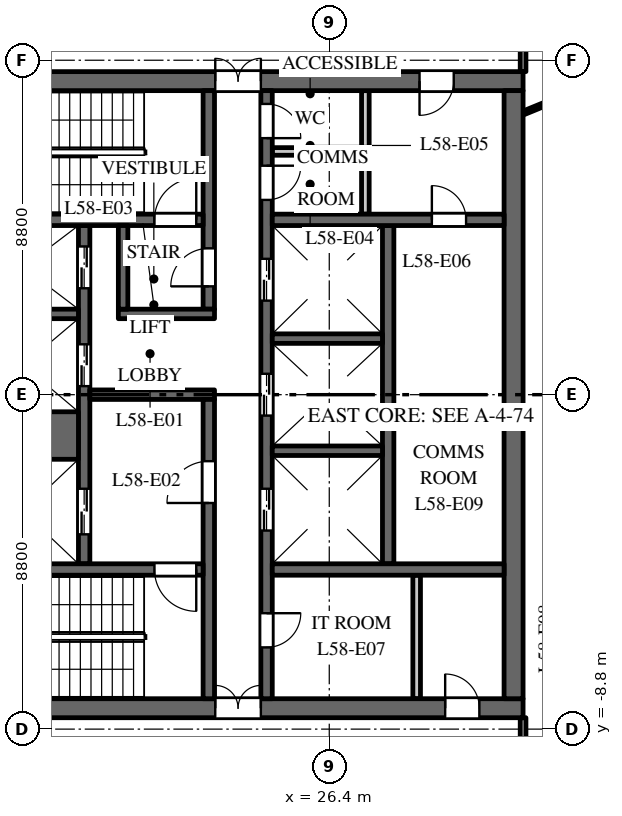
"""IFC4 building model, lengths in metres.
Left out: names, types, materials, properties, quantities, classifications, styles, units other than length and angle.
Written with IfcOpenShell. Run it as: python <this file> out.ifc"""

import sys

from ifc_helpers import new_model, si_unit, direction, frame, frame_2d, origin, place, context, subcontext, project, spatial, rectangle, extrude, element, fill, save


model = new_model("IFC4")
c1 = context("Model", 3, precision=1e-05, world=origin(), true_north=direction((0.0, 1.0)))
c2 = subcontext(c1, "Body", "Model", "MODEL_VIEW")
j1 = project(units=[si_unit("LENGTHUNIT", "METRE"), si_unit("PLANEANGLEUNIT", "RADIAN")], contexts=[c1])
p1 = place(None, origin())
s1 = spatial("IfcSite", under=j1, at=p1, CompositionType="ELEMENT")
p2 = place(p1, origin())
s2 = spatial("IfcBuilding", under=s1, at=p2, CompositionType="ELEMENT")
p3 = place(p2, frame((0.0, 0.0, 273.5)))
s3 = spatial("IfcBuildingStorey", under=s2, at=p3, CompositionType="ELEMENT", Elevation=273.5)
p4 = place(p3, frame((16.5, 8.25, 0.0), z_axis=(0.0, 0.0, 1.0), x_axis=(1.0, 0.0, 0.0)))
e1 = element("IfcWall", 1, at=p4, inside=s3, PredefinedType="SHEAR", context=c2, shape_type="SweptSolid", body=[
    extrude(rectangle(XDim=15.0, YDim=0.5, at=frame_2d((7.5, 0.0))), origin(), (0.0, 0.0, 1.0), 3.7),
])
p5 = place(p4, frame((6.9, 0.0, 0.0)))
e2 = element("IfcOpeningElement", 2, at=p5, cuts=e1, PredefinedType="OPENING", context=c2, shape_type="SweptSolid", body=[
    extrude(rectangle(XDim=1.2, YDim=2.1, at=frame_2d((0.6, 1.05))), frame((0.0, 0.26, 0.0), z_axis=(0.0, -1.0, 0.0), x_axis=(1.0, 0.0, 0.0)), (0.0, 0.0, 1.0), 0.52),
])
p6 = place(p4, frame((12.275, 0.0, 0.0)))
e3 = element("IfcOpeningElement", 3, at=p6, cuts=e1, PredefinedType="OPENING", context=c2, shape_type="SweptSolid", body=[
    extrude(rectangle(XDim=0.9, YDim=2.1, at=frame_2d((0.45, 1.05))), frame((0.0, 0.26, 0.0), z_axis=(0.0, -1.0, 0.0), x_axis=(1.0, 0.0, 0.0)), (0.0, 0.0, 1.0), 0.52),
])
p7 = place(p3, frame((16.5, -8.25, 0.0), z_axis=(0.0, 0.0, 1.0), x_axis=(1.0, 0.0, 0.0)))
e4 = element("IfcWall", 4, at=p7, inside=s3, PredefinedType="SHEAR", context=c2, shape_type="SweptSolid", body=[
    extrude(rectangle(XDim=15.0, YDim=0.5, at=frame_2d((7.5, 0.0))), origin(), (0.0, 0.0, 1.0), 3.7),
])
p8 = place(p7, frame((6.9, 0.0, 0.0)))
e5 = element("IfcOpeningElement", 5, at=p8, cuts=e4, PredefinedType="OPENING", context=c2, shape_type="SweptSolid", body=[
    extrude(rectangle(XDim=1.2, YDim=2.1, at=frame_2d((0.6, 1.05))), frame((0.0, 0.26, 0.0), z_axis=(0.0, -1.0, 0.0), x_axis=(1.0, 0.0, 0.0)), (0.0, 0.0, 1.0), 0.52),
])
p9 = place(p7, frame((12.95, 0.0, 0.0)))
e6 = element("IfcOpeningElement", 6, at=p9, cuts=e4, PredefinedType="OPENING", context=c2, shape_type="SweptSolid", body=[
    extrude(rectangle(XDim=0.9, YDim=2.1, at=frame_2d((0.45, 1.05))), frame((0.0, 0.26, 0.0), z_axis=(0.0, -1.0, 0.0), x_axis=(1.0, 0.0, 0.0)), (0.0, 0.0, 1.0), 0.52),
])
p10 = place(p3, frame((27.95, -4.45, 0.0), z_axis=(0.0, 0.0, 1.0), x_axis=(0.0, 1.0, 0.0)))
e7 = element("IfcWall", 7, at=p10, inside=s3, PredefinedType="SHEAR", context=c2, shape_type="SweptSolid", body=[
    extrude(rectangle(XDim=8.9, YDim=0.3, at=frame_2d((4.45, 0.0))), origin(), (0.0, 0.0, 1.0), 3.7),
])
p11 = place(p3, frame((19.95, -4.45, 0.0), z_axis=(0.0, 0.0, 1.0), x_axis=(0.0, 1.0, 0.0)))
e8 = element("IfcWall", 8, at=p11, inside=s3, PredefinedType="SHEAR", context=c2, shape_type="SweptSolid", body=[
    extrude(rectangle(XDim=8.9, YDim=0.3, at=frame_2d((4.45, 0.0))), origin(), (0.0, 0.0, 1.0), 3.7),
])
p12 = place(p11, frame((0.775, 0.0, 0.0)))
e9 = element("IfcOpeningElement", 9, at=p12, cuts=e8, PredefinedType="OPENING", context=c2, shape_type="SweptSolid", body=[
    extrude(rectangle(XDim=1.2, YDim=2.1, at=frame_2d((0.6, 1.05))), frame((0.0, 0.16, 0.0), z_axis=(0.0, -1.0, 0.0), x_axis=(1.0, 0.0, 0.0)), (0.0, 0.0, 1.0), 0.32),
])
p13 = place(p11, frame((4.675, 0.0, 0.0)))
e10 = element("IfcOpeningElement", 10, at=p13, cuts=e8, PredefinedType="OPENING", context=c2, shape_type="SweptSolid", body=[
    extrude(rectangle(XDim=1.1, YDim=2.1, at=frame_2d((0.55, 1.05))), frame((0.0, 0.16, 0.0), z_axis=(0.0, -1.0, 0.0), x_axis=(1.0, 0.0, 0.0)), (0.0, 0.0, 1.0), 0.32),
])
p14 = place(p11, frame((7.25, 0.0, 0.0)))
e11 = element("IfcOpeningElement", 11, at=p14, cuts=e8, PredefinedType="OPENING", context=c2, shape_type="SweptSolid", body=[
    extrude(rectangle(XDim=1.1, YDim=2.1, at=frame_2d((0.55, 1.05))), frame((0.0, 0.16, 0.0), z_axis=(0.0, -1.0, 0.0), x_axis=(1.0, 0.0, 0.0)), (0.0, 0.0, 1.0), 0.32),
])
p15 = place(p3, frame((24.75, -8.0, 0.0), z_axis=(0.0, 0.0, 1.0), x_axis=(0.0, 1.0, 0.0)))
e12 = element("IfcWall", 12, at=p15, inside=s3, PredefinedType="SHEAR", context=c2, shape_type="SweptSolid", body=[
    extrude(rectangle(XDim=16.0, YDim=0.3, at=frame_2d((8.0, 0.0))), origin(), (0.0, 0.0, 1.0), 3.7),
])
p16 = place(p15, frame((4.425, 0.0, 0.0)))
e13 = element("IfcOpeningElement", 13, at=p16, cuts=e12, PredefinedType="OPENING", context=c2, shape_type="SweptSolid", body=[
    extrude(rectangle(XDim=1.1, YDim=2.1, at=frame_2d((0.55, 1.05))), frame((0.0, 0.16, 0.0), z_axis=(0.0, -1.0, 0.0), x_axis=(1.0, 0.0, 0.0)), (0.0, 0.0, 1.0), 0.32),
])
p17 = place(p15, frame((7.45, 0.0, 0.0)))
e14 = element("IfcOpeningElement", 14, at=p17, cuts=e12, PredefinedType="OPENING", context=c2, shape_type="SweptSolid", body=[
    extrude(rectangle(XDim=1.1, YDim=2.1, at=frame_2d((0.55, 1.05))), frame((0.0, 0.16, 0.0), z_axis=(0.0, -1.0, 0.0), x_axis=(1.0, 0.0, 0.0)), (0.0, 0.0, 1.0), 0.32),
])
p18 = place(p15, frame((10.475, 0.0, 0.0)))
e15 = element("IfcOpeningElement", 15, at=p18, cuts=e12, PredefinedType="OPENING", context=c2, shape_type="SweptSolid", body=[
    extrude(rectangle(XDim=1.1, YDim=2.1, at=frame_2d((0.55, 1.05))), frame((0.0, 0.16, 0.0), z_axis=(0.0, -1.0, 0.0), x_axis=(1.0, 0.0, 0.0)), (0.0, 0.0, 1.0), 0.32),
])
p19 = place(p15, frame((13.125, 0.0, 0.0)))
e16 = element("IfcOpeningElement", 16, at=p19, cuts=e12, PredefinedType="OPENING", context=c2, shape_type="SweptSolid", body=[
    extrude(rectangle(XDim=0.9, YDim=2.1, at=frame_2d((0.45, 1.05))), frame((0.0, 0.16, 0.0), z_axis=(0.0, -1.0, 0.0), x_axis=(1.0, 0.0, 0.0)), (0.0, 0.0, 1.0), 0.32),
])
p20 = place(p15, frame((14.75, 0.0, 0.0)))
e17 = element("IfcOpeningElement", 17, at=p20, cuts=e12, PredefinedType="OPENING", context=c2, shape_type="SweptSolid", body=[
    extrude(rectangle(XDim=0.9, YDim=2.1, at=frame_2d((0.45, 1.05))), frame((0.0, 0.16, 0.0), z_axis=(0.0, -1.0, 0.0), x_axis=(1.0, 0.0, 0.0)), (0.0, 0.0, 1.0), 0.32),
])
p21 = place(p15, frame((1.35, 0.0, 0.0)))
e18 = element("IfcOpeningElement", 18, at=p21, cuts=e12, PredefinedType="OPENING", context=c2, shape_type="SweptSolid", body=[
    extrude(rectangle(XDim=0.9, YDim=2.1, at=frame_2d((0.45, 1.05))), frame((0.0, 0.16, 0.0), z_axis=(0.0, -1.0, 0.0), x_axis=(1.0, 0.0, 0.0)), (0.0, 0.0, 1.0), 0.32),
])
p22 = place(p3, frame((20.1, 0.0, 0.0), z_axis=(0.0, 0.0, 1.0), x_axis=(1.0, 0.0, 0.0)))
e19 = element("IfcWall", 19, at=p22, inside=s3, PredefinedType="SHEAR", context=c2, shape_type="SweptSolid", body=[
    extrude(rectangle(XDim=3.28, YDim=0.25, at=frame_2d((1.64, 0.0))), origin(), (0.0, 0.0, 1.0), 3.7),
])
p23 = place(p3, frame((31.25, -8.0, 0.0), z_axis=(0.0, 0.0, 1.0), x_axis=(0.0, 1.0, 0.0)))
e20 = element("IfcWall", 20, at=p23, inside=s3, PredefinedType="SHEAR", context=c2, shape_type="SweptSolid", body=[
    extrude(rectangle(XDim=16.0, YDim=0.5, at=frame_2d((8.0, 0.0))), origin(), (0.0, 0.0, 1.0), 3.7),
])
p24 = place(p3, frame((24.9, 4.6, 0.0), z_axis=(0.0, 0.0, 1.0), x_axis=(1.0, 0.0, 0.0)))
e21 = element("IfcWall", 21, at=p24, inside=s3, PredefinedType="SHEAR", context=c2, shape_type="SweptSolid", body=[
    extrude(rectangle(XDim=6.1, YDim=0.3, at=frame_2d((3.05, 0.0))), origin(), (0.0, 0.0, 1.0), 3.7),
])
p25 = place(p24, frame((4.2, 0.0, 0.0)))
e22 = element("IfcOpeningElement", 22, at=p25, cuts=e21, PredefinedType="OPENING", context=c2, shape_type="SweptSolid", body=[
    extrude(rectangle(XDim=0.9, YDim=2.1, at=frame_2d((0.45, 1.05))), frame((0.0, 0.16, 0.0), z_axis=(0.0, -1.0, 0.0), x_axis=(1.0, 0.0, 0.0)), (0.0, 0.0, 1.0), 0.32),
])
for number, where, z_axis, x_axis in (
    (23, (27.35, 4.75, 0.0), (0.0, 0.0, 1.0), (0.0, 1.0, 0.0)),
    (24, (28.7, -8.0, 0.0), (0.0, 0.0, 1.0), (0.0, 1.0, 0.0)),
):
    element("IfcWall", number, at=place(p3, frame(where, z_axis=z_axis, x_axis=x_axis)), inside=s3, PredefinedType="PARTITIONING", context=c2, shape_type="SweptSolid", body=[
        extrude(rectangle(XDim=3.25, YDim=0.2, at=frame_2d((1.625, 0.0))), origin(), (0.0, 0.0, 1.0), 3.7),
    ])
p26 = place(p3, frame((24.9, 6.4, 0.0), z_axis=(0.0, 0.0, 1.0), x_axis=(1.0, 0.0, 0.0)))
e25 = element("IfcWall", 25, at=p26, inside=s3, PredefinedType="PARTITIONING", context=c2, shape_type="SweptSolid", body=[
    extrude(rectangle(XDim=2.35, YDim=0.2, at=frame_2d((1.175, 0.0))), origin(), (0.0, 0.0, 1.0), 3.7),
])
p27 = place(p3, frame((24.9, -4.6, 0.0), z_axis=(0.0, 0.0, 1.0), x_axis=(1.0, 0.0, 0.0)))
e26 = element("IfcWall", 26, at=p27, inside=s3, PredefinedType="SHEAR", context=c2, shape_type="SweptSolid", body=[
    extrude(rectangle(XDim=6.1, YDim=0.3, at=frame_2d((3.05, 0.0))), origin(), (0.0, 0.0, 1.0), 3.7),
])
p28 = place(p3, frame((16.9, -1.075, 0.0), z_axis=(0.0, 0.0, 1.0), x_axis=(1.0, 0.0, 0.0)))
e27 = element("IfcWall", 27, at=p28, inside=s3, PredefinedType="SHEAR", context=c2, shape_type="SweptSolid", body=[
    extrude(rectangle(XDim=2.9, YDim=1.25, at=frame_2d((1.45, 0.0))), origin(), (0.0, 0.0, 1.0), 3.7),
])
for number, where, z_axis, x_axis in (
    (28, (16.9, 2.125, 0.0), (0.0, 0.0, 1.0), (1.0, 0.0, 0.0)),
    (29, (24.9, -1.475, 0.0), (0.0, 0.0, 1.0), (1.0, 0.0, 0.0)),
    (30, (24.9, 1.475, 0.0), (0.0, 0.0, 1.0), (1.0, 0.0, 0.0)),
):
    element("IfcWall", number, at=place(p3, frame(where, z_axis=z_axis, x_axis=x_axis)), inside=s3, PredefinedType="SHEAR", context=c2, shape_type="SweptSolid", body=[
        extrude(rectangle(XDim=2.9, YDim=0.25, at=frame_2d((1.45, 0.0))), origin(), (0.0, 0.0, 1.0), 3.7),
    ])
p29 = place(p3, frame((23.23, 2.25, 0.0), z_axis=(0.0, 0.0, 1.0), x_axis=(0.0, 1.0, 0.0)))
e31 = element("IfcWall", 31, at=p29, inside=s3, PredefinedType="SHEAR", context=c2, shape_type="SweptSolid", body=[
    extrude(rectangle(XDim=5.75, YDim=0.3, at=frame_2d((2.875, 0.0))), origin(), (0.0, 0.0, 1.0), 3.7),
])
p30 = place(p29, frame((0.6, 0.0, 0.0)))
e32 = element("IfcOpeningElement", 32, at=p30, cuts=e31, PredefinedType="OPENING", context=c2, shape_type="SweptSolid", body=[
    extrude(rectangle(XDim=1.0, YDim=2.1, at=frame_2d((0.5, 1.05))), frame((0.0, 0.16, 0.0), z_axis=(0.0, -1.0, 0.0), x_axis=(1.0, 0.0, 0.0)), (0.0, 0.0, 1.0), 0.32),
])
p31 = place(p3, frame((23.23, -8.0, 0.0), z_axis=(0.0, 0.0, 1.0), x_axis=(0.0, 1.0, 0.0)))
e33 = element("IfcWall", 33, at=p31, inside=s3, PredefinedType="SHEAR", context=c2, shape_type="SweptSolid", body=[
    extrude(rectangle(XDim=7.875, YDim=0.3, at=frame_2d((3.938, 0.0))), origin(), (0.0, 0.0, 1.0), 3.7),
])
p32 = place(p31, frame((5.15, 0.0, 0.0)))
e34 = element("IfcOpeningElement", 34, at=p32, cuts=e33, PredefinedType="OPENING", context=c2, shape_type="SweptSolid", body=[
    extrude(rectangle(XDim=1.1, YDim=2.1, at=frame_2d((0.55, 1.05))), frame((0.0, 0.16, 0.0), z_axis=(0.0, -1.0, 0.0), x_axis=(1.0, 0.0, 0.0)), (0.0, 0.0, 1.0), 0.32),
])
p33 = place(p3, frame((16.9, 4.6, 0.0), z_axis=(0.0, 0.0, 1.0), x_axis=(1.0, 0.0, 0.0)))
e35 = element("IfcWall", 35, at=p33, inside=s3, PredefinedType="SHEAR", context=c2, shape_type="SweptSolid", body=[
    extrude(rectangle(XDim=6.18, YDim=0.3, at=frame_2d((3.09, 0.0))), origin(), (0.0, 0.0, 1.0), 3.7),
])
p34 = place(p33, frame((4.9, 0.0, 0.0)))
e36 = element("IfcOpeningElement", 36, at=p34, cuts=e35, PredefinedType="OPENING", context=c2, shape_type="SweptSolid", body=[
    extrude(rectangle(XDim=1.1, YDim=2.1, at=frame_2d((0.55, 1.05))), frame((0.0, 0.16, 0.0), z_axis=(0.0, -1.0, 0.0), x_axis=(1.0, 0.0, 0.0)), (0.0, 0.0, 1.0), 0.32),
])
p35 = place(p3, frame((16.9, -4.6, 0.0), z_axis=(0.0, 0.0, 1.0), x_axis=(1.0, 0.0, 0.0)))
e37 = element("IfcWall", 37, at=p35, inside=s3, PredefinedType="SHEAR", context=c2, shape_type="SweptSolid", body=[
    extrude(rectangle(XDim=6.18, YDim=0.3, at=frame_2d((3.09, 0.0))), origin(), (0.0, 0.0, 1.0), 3.7),
])
p36 = place(p35, frame((4.9, 0.0, 0.0)))
e38 = element("IfcOpeningElement", 38, at=p36, cuts=e37, PredefinedType="OPENING", context=c2, shape_type="SweptSolid", body=[
    extrude(rectangle(XDim=1.1, YDim=2.1, at=frame_2d((0.55, 1.05))), frame((0.0, 0.16, 0.0), z_axis=(0.0, -1.0, 0.0), x_axis=(1.0, 0.0, 0.0)), (0.0, 0.0, 1.0), 0.32),
])
p37 = place(p3, frame((20.85, 2.125, 0.0), z_axis=(0.0, 0.0, 1.0), x_axis=(1.0, 0.0, 0.0)))
e39 = element("IfcWall", 39, at=p37, inside=s3, PredefinedType="SHEAR", context=c2, shape_type="SweptSolid", body=[
    extrude(rectangle(XDim=2.53, YDim=0.25, at=frame_2d((1.265, 0.0))), origin(), (0.0, 0.0, 1.0), 3.7),
])
p38 = place(p3, frame((20.975, 2.25, 0.0), z_axis=(0.0, 0.0, 1.0), x_axis=(0.0, 1.0, 0.0)))
e40 = element("IfcWall", 40, at=p38, inside=s3, PredefinedType="SHEAR", context=c2, shape_type="SweptSolid", body=[
    extrude(rectangle(XDim=2.2, YDim=0.25, at=frame_2d((1.1, 0.0))), origin(), (0.0, 0.0, 1.0), 3.7),
])
p39 = place(p3, frame((31.5, -10.7, 0.0), z_axis=(0.0, 0.0, 1.0), x_axis=(0.0, 1.0, 0.0)))
e41 = element("IfcWall", 41, at=p39, inside=s3, PredefinedType="PARTITIONING", context=c2, shape_type="SweptSolid", body=[
    extrude(rectangle(XDim=2.2, YDim=0.15, at=frame_2d((1.1, 0.0))), origin(), (0.0, 0.0, 1.0), 3.0),
])
p40 = place(p3, frame((31.5, 7.41, 0.0), z_axis=(0.0, 0.0, 1.0), x_axis=(0.925344112436, 0.379128307542, 0.0)))
e42 = element("IfcWall", 42, at=p40, inside=s3, PredefinedType="PARTITIONING", context=c2, shape_type="SweptSolid", body=[
    extrude(rectangle(XDim=2.954, YDim=0.1, at=frame_2d((1.477, 0.0))), origin(), (0.0, 0.0, 1.0), 3.2),
])
p41 = place(p3, frame((31.5, 8.5, 0.0), z_axis=(0.0, 0.0, 1.0), x_axis=(0.0, 1.0, 0.0)))
e43 = element("IfcWall", 43, at=p41, inside=s3, PredefinedType="PARTITIONING", context=c2, shape_type="SweptSolid", body=[
    extrude(rectangle(XDim=2.2, YDim=0.15, at=frame_2d((1.1, 0.0))), origin(), (0.0, 0.0, 1.0), 3.0),
])
p42 = place(p12, origin())
e44 = element("IfcDoor", 44, at=p42, inside=s3, OperationType="DOUBLE_DOOR_SLIDING", PredefinedType="DOOR", context=c2, shape_type="SweptSolid", body=[
    extrude(rectangle(XDim=1.2, YDim=2.1, at=frame_2d((0.6, 1.05))), frame((0.0, 0.025, 0.0), z_axis=(0.0, -1.0, 0.0), x_axis=(1.0, 0.0, 0.0)), (0.0, 0.0, 1.0), 0.05),
])
fill(e9, e44)
p43 = place(p13, origin())
e45 = element("IfcDoor", 45, at=p43, inside=s3, OperationType="DOUBLE_DOOR_SLIDING", PredefinedType="DOOR", context=c2, shape_type="SweptSolid", body=[
    extrude(rectangle(XDim=1.1, YDim=2.1, at=frame_2d((0.55, 1.05))), frame((0.0, 0.025, 0.0), z_axis=(0.0, -1.0, 0.0), x_axis=(1.0, 0.0, 0.0)), (0.0, 0.0, 1.0), 0.05),
])
fill(e10, e45)
p44 = place(p14, origin())
e46 = element("IfcDoor", 46, at=p44, inside=s3, OperationType="DOUBLE_DOOR_SLIDING", PredefinedType="DOOR", context=c2, shape_type="SweptSolid", body=[
    extrude(rectangle(XDim=1.1, YDim=2.1, at=frame_2d((0.55, 1.05))), frame((0.0, 0.025, 0.0), z_axis=(0.0, -1.0, 0.0), x_axis=(1.0, 0.0, 0.0)), (0.0, 0.0, 1.0), 0.05),
])
fill(e11, e46)
p45 = place(p16, origin())
e47 = element("IfcDoor", 47, at=p45, inside=s3, OperationType="DOUBLE_DOOR_SLIDING", PredefinedType="DOOR", context=c2, shape_type="SweptSolid", body=[
    extrude(rectangle(XDim=1.1, YDim=2.1, at=frame_2d((0.55, 1.05))), frame((0.0, 0.025, 0.0), z_axis=(0.0, -1.0, 0.0), x_axis=(1.0, 0.0, 0.0)), (0.0, 0.0, 1.0), 0.05),
])
fill(e13, e47)
p46 = place(p17, origin())
e48 = element("IfcDoor", 48, at=p46, inside=s3, OperationType="DOUBLE_DOOR_SLIDING", PredefinedType="DOOR", context=c2, shape_type="SweptSolid", body=[
    extrude(rectangle(XDim=1.1, YDim=2.1, at=frame_2d((0.55, 1.05))), frame((0.0, 0.025, 0.0), z_axis=(0.0, -1.0, 0.0), x_axis=(1.0, 0.0, 0.0)), (0.0, 0.0, 1.0), 0.05),
])
fill(e14, e48)
p47 = place(p18, origin())
e49 = element("IfcDoor", 49, at=p47, inside=s3, OperationType="DOUBLE_DOOR_SLIDING", PredefinedType="DOOR", context=c2, shape_type="SweptSolid", body=[
    extrude(rectangle(XDim=1.1, YDim=2.1, at=frame_2d((0.55, 1.05))), frame((0.0, 0.025, 0.0), z_axis=(0.0, -1.0, 0.0), x_axis=(1.0, 0.0, 0.0)), (0.0, 0.0, 1.0), 0.05),
])
fill(e15, e49)
p48 = place(p34, origin())
e50 = element("IfcDoor", 50, at=p48, inside=s3, OperationType="SINGLE_SWING_LEFT", PredefinedType="DOOR", context=c2, shape_type="SweptSolid", body=[
    extrude(rectangle(XDim=1.1, YDim=2.1, at=frame_2d((0.55, 1.05))), frame((0.0, 0.025, 0.0), z_axis=(0.0, -1.0, 0.0), x_axis=(1.0, 0.0, 0.0)), (0.0, 0.0, 1.0), 0.05),
])
fill(e36, e50)
p49 = place(p36, origin())
e51 = element("IfcDoor", 51, at=p49, inside=s3, OperationType="SINGLE_SWING_RIGHT", PredefinedType="DOOR", context=c2, shape_type="SweptSolid", body=[
    extrude(rectangle(XDim=1.1, YDim=2.1, at=frame_2d((0.55, 1.05))), frame((0.0, 0.025, 0.0), z_axis=(0.0, -1.0, 0.0), x_axis=(1.0, 0.0, 0.0)), (0.0, 0.0, 1.0), 0.05),
])
fill(e38, e51)
p50 = place(p32, origin())
e52 = element("IfcDoor", 52, at=p50, inside=s3, OperationType="SINGLE_SWING_RIGHT", PredefinedType="DOOR", context=c2, shape_type="SweptSolid", body=[
    extrude(rectangle(XDim=1.1, YDim=2.1, at=frame_2d((0.55, 1.05))), frame((0.0, 0.025, 0.0), z_axis=(0.0, -1.0, 0.0), x_axis=(1.0, 0.0, 0.0)), (0.0, 0.0, 1.0), 0.05),
])
fill(e34, e52)
p51 = place(p30, origin())
e53 = element("IfcDoor", 53, at=p51, inside=s3, OperationType="SINGLE_SWING_RIGHT", PredefinedType="DOOR", context=c2, shape_type="SweptSolid", body=[
    extrude(rectangle(XDim=1.0, YDim=2.1, at=frame_2d((0.5, 1.05))), frame((0.0, 0.025, 0.0), z_axis=(0.0, -1.0, 0.0), x_axis=(1.0, 0.0, 0.0)), (0.0, 0.0, 1.0), 0.05),
])
fill(e32, e53)
p52 = place(p5, origin())
e54 = element("IfcDoor", 54, at=p52, inside=s3, OperationType="DOUBLE_DOOR_DOUBLE_SWING", PredefinedType="DOOR", context=c2, shape_type="SweptSolid", body=[
    extrude(rectangle(XDim=1.2, YDim=2.1, at=frame_2d((0.6, 1.05))), frame((0.0, 0.025, 0.0), z_axis=(0.0, -1.0, 0.0), x_axis=(1.0, 0.0, 0.0)), (0.0, 0.0, 1.0), 0.05),
])
fill(e2, e54)
p53 = place(p8, origin())
e55 = element("IfcDoor", 55, at=p53, inside=s3, OperationType="DOUBLE_DOOR_DOUBLE_SWING", PredefinedType="DOOR", context=c2, shape_type="SweptSolid", body=[
    extrude(rectangle(XDim=1.2, YDim=2.1, at=frame_2d((0.6, 1.05))), frame((0.0, 0.025, 0.0), z_axis=(0.0, -1.0, 0.0), x_axis=(1.0, 0.0, 0.0)), (0.0, 0.0, 1.0), 0.05),
])
fill(e5, e55)
p54 = place(p19, origin())
e56 = element("IfcDoor", 56, at=p54, inside=s3, OperationType="SINGLE_SWING_RIGHT", PredefinedType="DOOR", context=c2, shape_type="SweptSolid", body=[
    extrude(rectangle(XDim=0.9, YDim=2.1, at=frame_2d((0.45, 1.05))), frame((0.0, 0.025, 0.0), z_axis=(0.0, -1.0, 0.0), x_axis=(1.0, 0.0, 0.0)), (0.0, 0.0, 1.0), 0.05),
])
fill(e16, e56)
p55 = place(p20, origin())
e57 = element("IfcDoor", 57, at=p55, inside=s3, OperationType="SINGLE_SWING_LEFT", PredefinedType="DOOR", context=c2, shape_type="SweptSolid", body=[
    extrude(rectangle(XDim=0.9, YDim=2.1, at=frame_2d((0.45, 1.05))), frame((0.0, 0.025, 0.0), z_axis=(0.0, -1.0, 0.0), x_axis=(1.0, 0.0, 0.0)), (0.0, 0.0, 1.0), 0.05),
])
fill(e17, e57)
p56 = place(p6, origin())
e58 = element("IfcDoor", 58, at=p56, inside=s3, OperationType="SINGLE_SWING_LEFT", PredefinedType="DOOR", context=c2, shape_type="SweptSolid", body=[
    extrude(rectangle(XDim=0.9, YDim=2.1, at=frame_2d((0.45, 1.05))), frame((0.0, 0.025, 0.0), z_axis=(0.0, -1.0, 0.0), x_axis=(1.0, 0.0, 0.0)), (0.0, 0.0, 1.0), 0.05),
])
fill(e3, e58)
p57 = place(p21, origin())
e59 = element("IfcDoor", 59, at=p57, inside=s3, OperationType="SINGLE_SWING_RIGHT", PredefinedType="DOOR", context=c2, shape_type="SweptSolid", body=[
    extrude(rectangle(XDim=0.9, YDim=2.1, at=frame_2d((0.45, 1.05))), frame((0.0, 0.025, 0.0), z_axis=(0.0, -1.0, 0.0), x_axis=(1.0, 0.0, 0.0)), (0.0, 0.0, 1.0), 0.05),
])
fill(e18, e59)
p58 = place(p9, origin())
e60 = element("IfcDoor", 60, at=p58, inside=s3, OperationType="SINGLE_SWING_RIGHT", PredefinedType="DOOR", context=c2, shape_type="SweptSolid", body=[
    extrude(rectangle(XDim=0.9, YDim=2.1, at=frame_2d((0.45, 1.05))), frame((0.0, 0.025, 0.0), z_axis=(0.0, -1.0, 0.0), x_axis=(1.0, 0.0, 0.0)), (0.0, 0.0, 1.0), 0.05),
])
fill(e6, e60)
p59 = place(p25, origin())
e61 = element("IfcDoor", 61, at=p59, inside=s3, OperationType="SINGLE_SWING_RIGHT", PredefinedType="DOOR", context=c2, shape_type="SweptSolid", body=[
    extrude(rectangle(XDim=0.9, YDim=2.1, at=frame_2d((0.45, 1.05))), frame((0.0, 0.025, 0.0), z_axis=(0.0, -1.0, 0.0), x_axis=(1.0, 0.0, 0.0)), (0.0, 0.0, 1.0), 0.05),
])
fill(e22, e61)
save(model, sys.argv[1])
